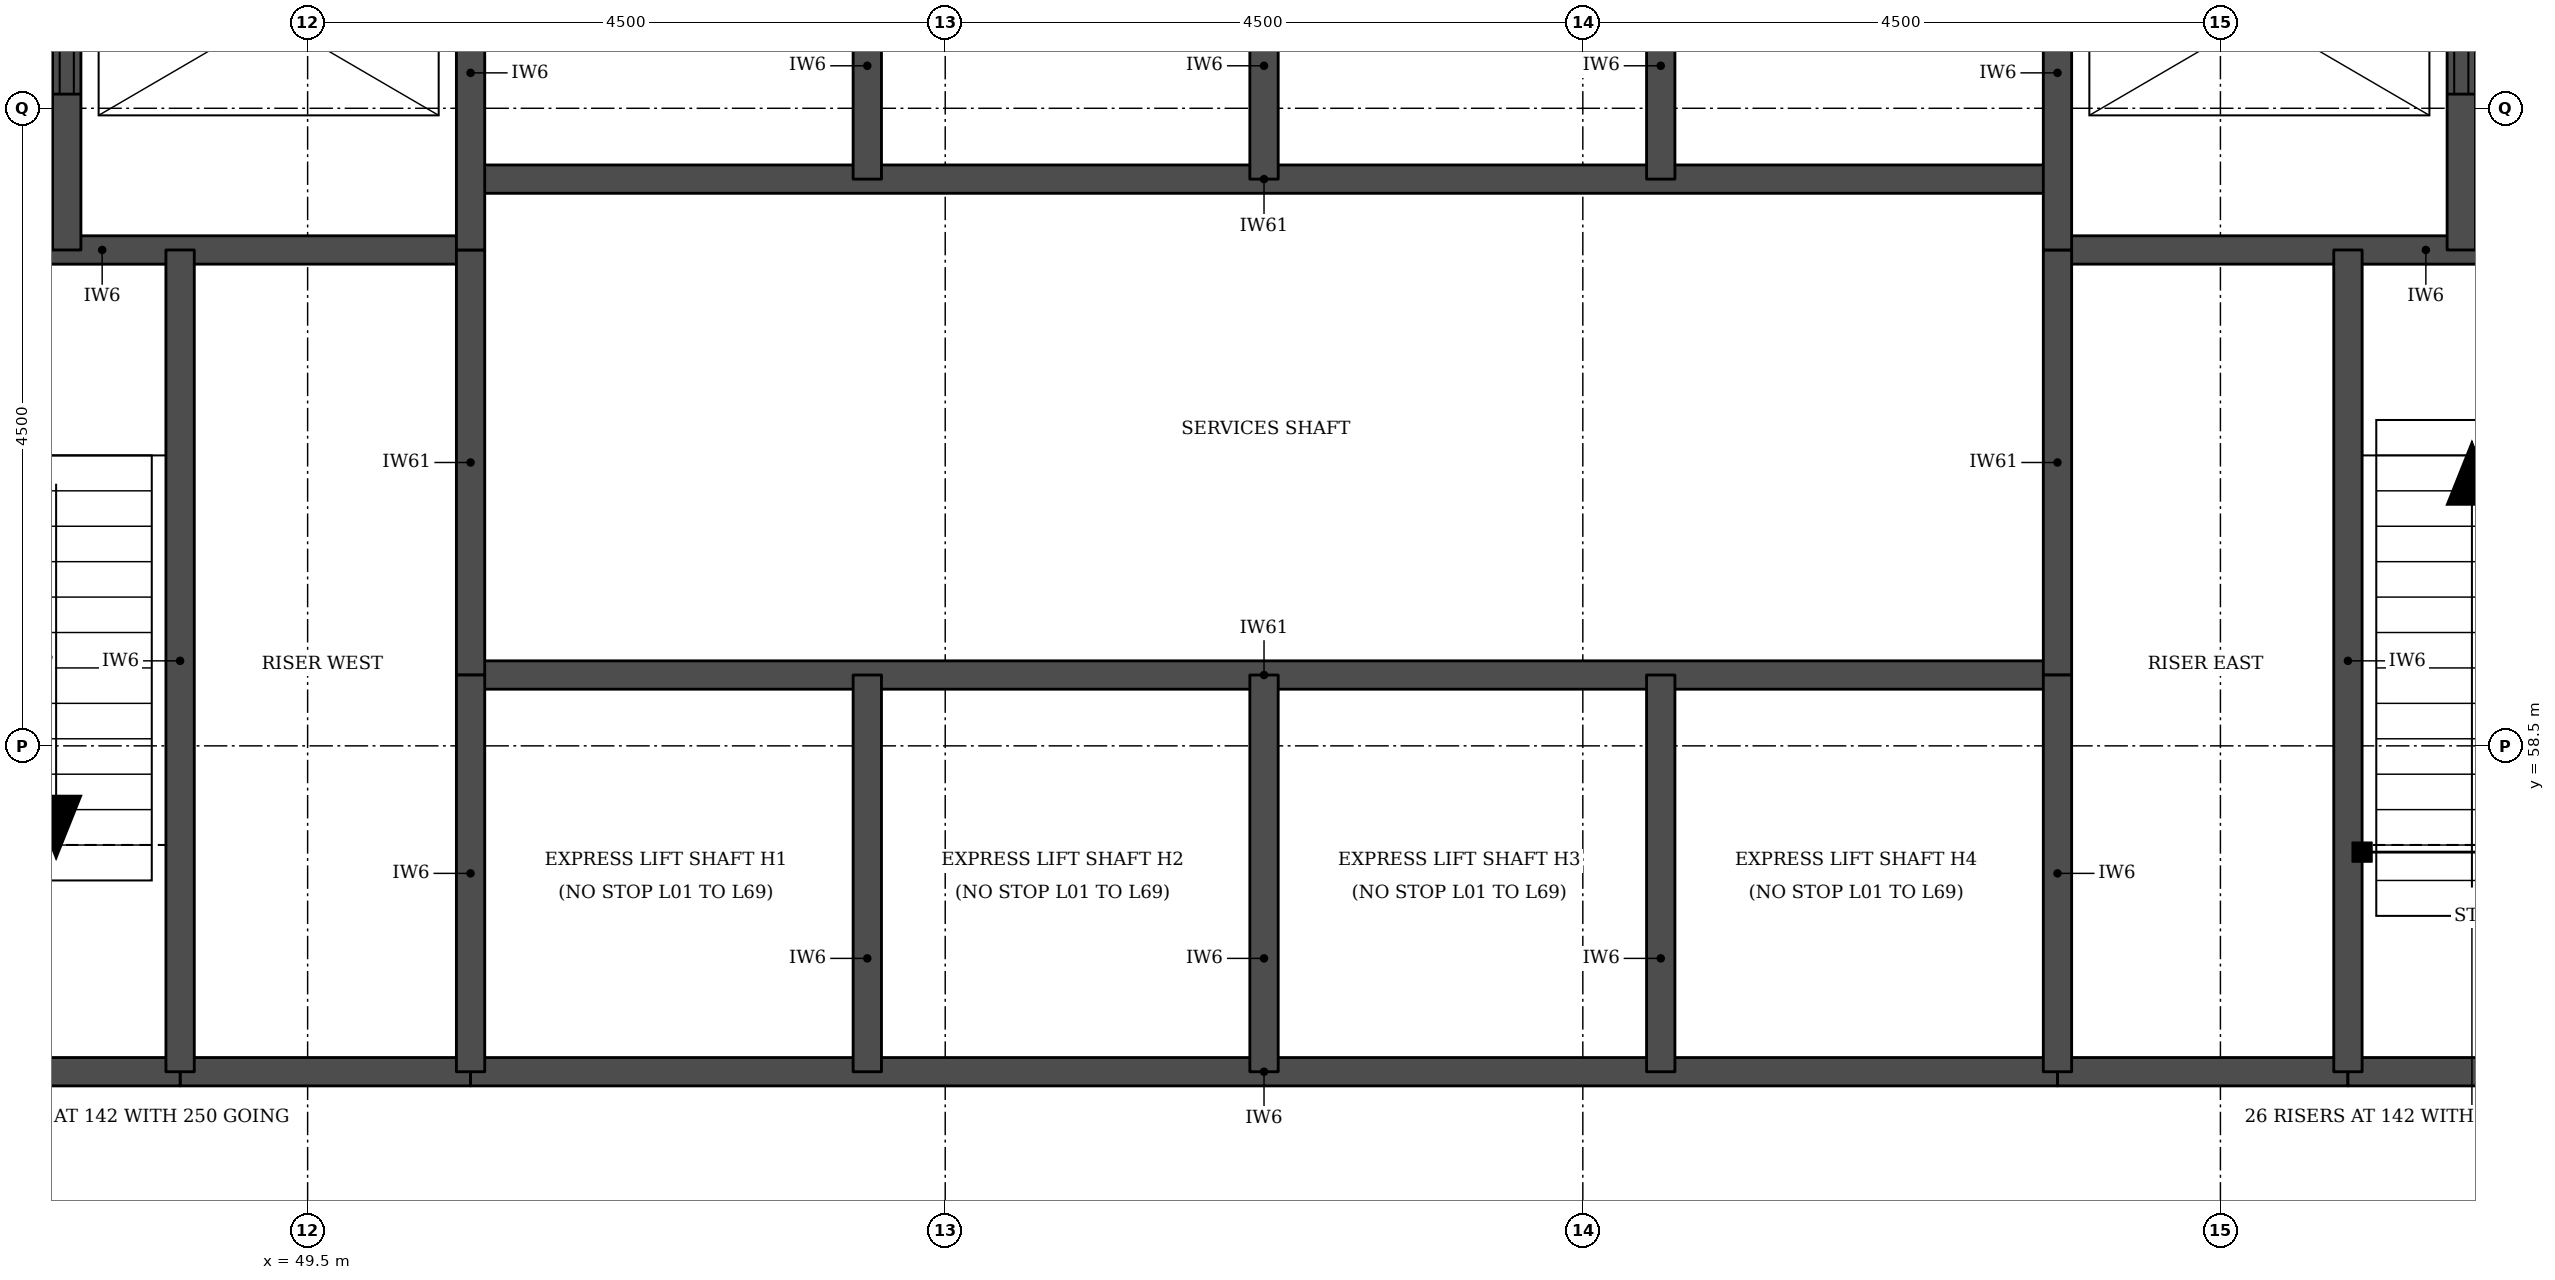
"""IFC4 building model, lengths in metres.
Left out: names, types, materials, properties, quantities, classifications, styles, units other than length and angle.
Written with IfcOpenShell. Run it as: python <this file> out.ifc"""

import sys

from ifc_helpers import new_model, si_unit, direction, frame, frame_2d, origin, place, context, subcontext, project, spatial, rectangle, extrude, element, fill, save


model = new_model("IFC4")
c1 = context("Model", 3, precision=1e-05, world=origin(), true_north=direction((0.0, 1.0)))
c2 = subcontext(c1, "Body", "Model", "MODEL_VIEW")
j1 = project(units=[si_unit("LENGTHUNIT", "METRE"), si_unit("PLANEANGLEUNIT", "RADIAN")], contexts=[c1])
p1 = place(None, origin())
s1 = spatial("IfcSite", under=j1, at=p1, CompositionType="ELEMENT")
p2 = place(p1, origin())
s2 = spatial("IfcBuilding", under=s1, at=p2, CompositionType="ELEMENT")
p3 = place(p2, frame((0.0, 0.0, 82.6)))
s3 = spatial("IfcBuildingStorey", under=s2, at=p3, CompositionType="ELEMENT", Elevation=82.6)
for number, where, z_axis, x_axis in (
    (1, (48.6, 56.2, 0.0), (0.0, 0.0, 1.0), (1.0, 0.0, 0.0)),
    (2, (61.85, 56.2, 0.0), (0.0, 0.0, 1.0), (1.0, 0.0, 0.0)),
):
    element("IfcWall", number, at=place(p3, frame(where, z_axis=z_axis, x_axis=x_axis)), inside=s3, PredefinedType="SOLIDWALL", context=c2, shape_type="SweptSolid", body=[
        extrude(rectangle(XDim=2.05, YDim=0.2, at=frame_2d((1.025, 0.0))), origin(), (0.0, 0.0, 1.0), 3.55),
    ])
p4 = place(p3, frame((45.45, 56.2, 0.0), z_axis=(0.0, 0.0, 1.0), x_axis=(1.0, 0.0, 0.0)))
e3 = element("IfcWall", 3, at=p4, inside=s3, PredefinedType="SOLIDWALL", context=c2, shape_type="SweptSolid", body=[
    extrude(rectangle(XDim=3.15, YDim=0.2, at=frame_2d((1.575, 0.0))), origin(), (0.0, 0.0, 1.0), 3.55),
])
p5 = place(p3, frame((50.65, 56.2, 0.0), z_axis=(0.0, 0.0, 1.0), x_axis=(1.0, 0.0, 0.0)))
e4 = element("IfcWall", 4, at=p5, inside=s3, PredefinedType="SOLIDWALL", context=c2, shape_type="SweptSolid", body=[
    extrude(rectangle(XDim=11.2, YDim=0.2, at=frame_2d((5.6, 0.0))), origin(), (0.0, 0.0, 1.0), 3.55),
])
p6 = place(p3, frame((63.9, 56.2, 0.0), z_axis=(0.0, 0.0, 1.0), x_axis=(1.0, 0.0, 0.0)))
e5 = element("IfcWall", 5, at=p6, inside=s3, PredefinedType="SOLIDWALL", context=c2, shape_type="SweptSolid", body=[
    extrude(rectangle(XDim=3.15, YDim=0.2, at=frame_2d((1.575, 0.0))), origin(), (0.0, 0.0, 1.0), 3.55),
])
p7 = place(p3, frame((50.65, 59.0, 0.0), z_axis=(0.0, 0.0, 1.0), x_axis=(1.0, 0.0, 0.0)))
e6 = element("IfcWall", 6, at=p7, inside=s3, PredefinedType="SOLIDWALL", context=c2, shape_type="SweptSolid", body=[
    extrude(rectangle(XDim=11.2, YDim=0.2, at=frame_2d((5.6, 0.0))), origin(), (0.0, 0.0, 1.0), 3.7),
])
for number, where, z_axis, x_axis in (
    (7, (45.45, 62.0, 0.0), (0.0, 0.0, 1.0), (1.0, 0.0, 0.0)),
    (8, (61.85, 62.0, 0.0), (0.0, 0.0, 1.0), (1.0, 0.0, 0.0)),
):
    element("IfcWall", number, at=place(p3, frame(where, z_axis=z_axis, x_axis=x_axis)), inside=s3, PredefinedType="SOLIDWALL", context=c2, shape_type="SweptSolid", body=[
        extrude(rectangle(XDim=5.2, YDim=0.2, at=frame_2d((2.6, 0.0))), origin(), (0.0, 0.0, 1.0), 3.55),
    ])
p8 = place(p3, frame((50.65, 62.5, 0.0), z_axis=(0.0, 0.0, 1.0), x_axis=(1.0, 0.0, 0.0)))
e9 = element("IfcWall", 9, at=p8, inside=s3, PredefinedType="SOLIDWALL", context=c2, shape_type="SweptSolid", body=[
    extrude(rectangle(XDim=11.2, YDim=0.2, at=frame_2d((5.6, 0.0))), origin(), (0.0, 0.0, 1.0), 3.7),
])
p9 = place(p3, frame((47.8, 62.0, 0.0), z_axis=(0.0, 0.0, 1.0), x_axis=(0.0, 1.0, 0.0)))
e10 = element("IfcWall", 10, at=p9, inside=s3, PredefinedType="SOLIDWALL", context=c2, shape_type="SweptSolid", body=[
    extrude(rectangle(XDim=3.3, YDim=0.2, at=frame_2d((1.65, 0.0))), origin(), (0.0, 0.0, 1.0), 3.55),
])
p10 = place(p9, frame((1.1, 0.0, 0.0)))
e11 = element("IfcOpeningElement", 11, at=p10, cuts=e10, PredefinedType="OPENING", context=c2, shape_type="SweptSolid", body=[
    extrude(rectangle(XDim=1.1, YDim=2.1, at=frame_2d((0.55, 1.05))), frame((0.0, 0.11, 0.0), z_axis=(0.0, -1.0, 0.0), x_axis=(1.0, 0.0, 0.0)), (0.0, 0.0, 1.0), 0.22),
])
p11 = place(p3, frame((48.6, 56.2, 0.0), z_axis=(0.0, 0.0, 1.0), x_axis=(0.0, 1.0, 0.0)))
e12 = element("IfcWall", 12, at=p11, inside=s3, PredefinedType="SOLIDWALL", context=c2, shape_type="SweptSolid", body=[
    extrude(rectangle(XDim=5.8, YDim=0.2, at=frame_2d((2.9, 0.0))), origin(), (0.0, 0.0, 1.0), 3.55),
])
p12 = place(p3, frame((50.65, 59.0, 0.0), z_axis=(0.0, 0.0, 1.0), x_axis=(0.0, 1.0, 0.0)))
e13 = element("IfcWall", 13, at=p12, inside=s3, PredefinedType="SOLIDWALL", context=c2, shape_type="SweptSolid", body=[
    extrude(rectangle(XDim=3.0, YDim=0.2, at=frame_2d((1.5, 0.0))), origin(), (0.0, 0.0, 1.0), 3.7),
])
p13 = place(p3, frame((50.65, 56.2, 0.0), z_axis=(0.0, 0.0, 1.0), x_axis=(0.0, 1.0, 0.0)))
e14 = element("IfcWall", 14, at=p13, inside=s3, PredefinedType="SOLIDWALL", context=c2, shape_type="SweptSolid", body=[
    extrude(rectangle(XDim=2.8, YDim=0.2, at=frame_2d((1.4, 0.0))), origin(), (0.0, 0.0, 1.0), 3.55),
])
p14 = place(p3, frame((50.65, 62.0, 0.0), z_axis=(0.0, 0.0, 1.0), x_axis=(0.0, 1.0, 0.0)))
e15 = element("IfcWall", 15, at=p14, inside=s3, PredefinedType="SOLIDWALL", context=c2, shape_type="SweptSolid", body=[
    extrude(rectangle(XDim=3.3, YDim=0.2, at=frame_2d((1.65, 0.0))), origin(), (0.0, 0.0, 1.0), 3.55),
])
for number, where, z_axis, x_axis in (
    (16, (53.45, 56.2, 0.0), (0.0, 0.0, 1.0), (0.0, 1.0, 0.0)),
    (17, (53.45, 62.5, 0.0), (0.0, 0.0, 1.0), (0.0, 1.0, 0.0)),
    (18, (56.25, 56.2, 0.0), (0.0, 0.0, 1.0), (0.0, 1.0, 0.0)),
    (19, (56.25, 62.5, 0.0), (0.0, 0.0, 1.0), (0.0, 1.0, 0.0)),
    (20, (59.05, 56.2, 0.0), (0.0, 0.0, 1.0), (0.0, 1.0, 0.0)),
    (21, (59.05, 62.5, 0.0), (0.0, 0.0, 1.0), (0.0, 1.0, 0.0)),
):
    element("IfcWall", number, at=place(p3, frame(where, z_axis=z_axis, x_axis=x_axis)), inside=s3, PredefinedType="SOLIDWALL", context=c2, shape_type="SweptSolid", body=[
        extrude(rectangle(XDim=2.8, YDim=0.2, at=frame_2d((1.4, 0.0))), origin(), (0.0, 0.0, 1.0), 3.55),
    ])
p15 = place(p3, frame((61.85, 59.0, 0.0), z_axis=(0.0, 0.0, 1.0), x_axis=(0.0, 1.0, 0.0)))
e22 = element("IfcWall", 22, at=p15, inside=s3, PredefinedType="SOLIDWALL", context=c2, shape_type="SweptSolid", body=[
    extrude(rectangle(XDim=3.0, YDim=0.2, at=frame_2d((1.5, 0.0))), origin(), (0.0, 0.0, 1.0), 3.7),
])
p16 = place(p3, frame((61.85, 56.2, 0.0), z_axis=(0.0, 0.0, 1.0), x_axis=(0.0, 1.0, 0.0)))
e23 = element("IfcWall", 23, at=p16, inside=s3, PredefinedType="SOLIDWALL", context=c2, shape_type="SweptSolid", body=[
    extrude(rectangle(XDim=2.8, YDim=0.2, at=frame_2d((1.4, 0.0))), origin(), (0.0, 0.0, 1.0), 3.55),
])
p17 = place(p3, frame((61.85, 62.0, 0.0), z_axis=(0.0, 0.0, 1.0), x_axis=(0.0, 1.0, 0.0)))
e24 = element("IfcWall", 24, at=p17, inside=s3, PredefinedType="SOLIDWALL", context=c2, shape_type="SweptSolid", body=[
    extrude(rectangle(XDim=3.3, YDim=0.2, at=frame_2d((1.65, 0.0))), origin(), (0.0, 0.0, 1.0), 3.55),
])
p18 = place(p3, frame((63.9, 56.2, 0.0), z_axis=(0.0, 0.0, 1.0), x_axis=(0.0, 1.0, 0.0)))
e25 = element("IfcWall", 25, at=p18, inside=s3, PredefinedType="SOLIDWALL", context=c2, shape_type="SweptSolid", body=[
    extrude(rectangle(XDim=5.8, YDim=0.2, at=frame_2d((2.9, 0.0))), origin(), (0.0, 0.0, 1.0), 3.55),
])
p19 = place(p3, frame((64.7, 62.0, 0.0), z_axis=(0.0, 0.0, 1.0), x_axis=(0.0, 1.0, 0.0)))
e26 = element("IfcWall", 26, at=p19, inside=s3, PredefinedType="SOLIDWALL", context=c2, shape_type="SweptSolid", body=[
    extrude(rectangle(XDim=3.3, YDim=0.2, at=frame_2d((1.65, 0.0))), origin(), (0.0, 0.0, 1.0), 3.55),
])
p20 = place(p19, frame((1.1, 0.0, 0.0)))
e27 = element("IfcOpeningElement", 27, at=p20, cuts=e26, PredefinedType="OPENING", context=c2, shape_type="SweptSolid", body=[
    extrude(rectangle(XDim=1.1, YDim=2.1, at=frame_2d((0.55, 1.05))), frame((0.0, 0.11, 0.0), z_axis=(0.0, -1.0, 0.0), x_axis=(1.0, 0.0, 0.0)), (0.0, 0.0, 1.0), 0.22),
])
p21 = place(p10, origin())
e28 = element("IfcDoor", 28, at=p21, inside=s3, OperationType="DOUBLE_DOOR_SLIDING", PredefinedType="DOOR", context=c2, shape_type="SweptSolid", body=[
    extrude(rectangle(XDim=1.1, YDim=2.1, at=frame_2d((0.55, 1.05))), frame((0.0, 0.025, 0.0), z_axis=(0.0, -1.0, 0.0), x_axis=(1.0, 0.0, 0.0)), (0.0, 0.0, 1.0), 0.05),
])
fill(e11, e28)
p22 = place(p20, origin())
e29 = element("IfcDoor", 29, at=p22, inside=s3, OperationType="DOUBLE_DOOR_SLIDING", PredefinedType="DOOR", context=c2, shape_type="SweptSolid", body=[
    extrude(rectangle(XDim=1.1, YDim=2.1, at=frame_2d((0.55, 1.05))), frame((0.0, 0.025, 0.0), z_axis=(0.0, -1.0, 0.0), x_axis=(1.0, 0.0, 0.0)), (0.0, 0.0, 1.0), 0.05),
])
fill(e27, e29)
save(model, sys.argv[1])
